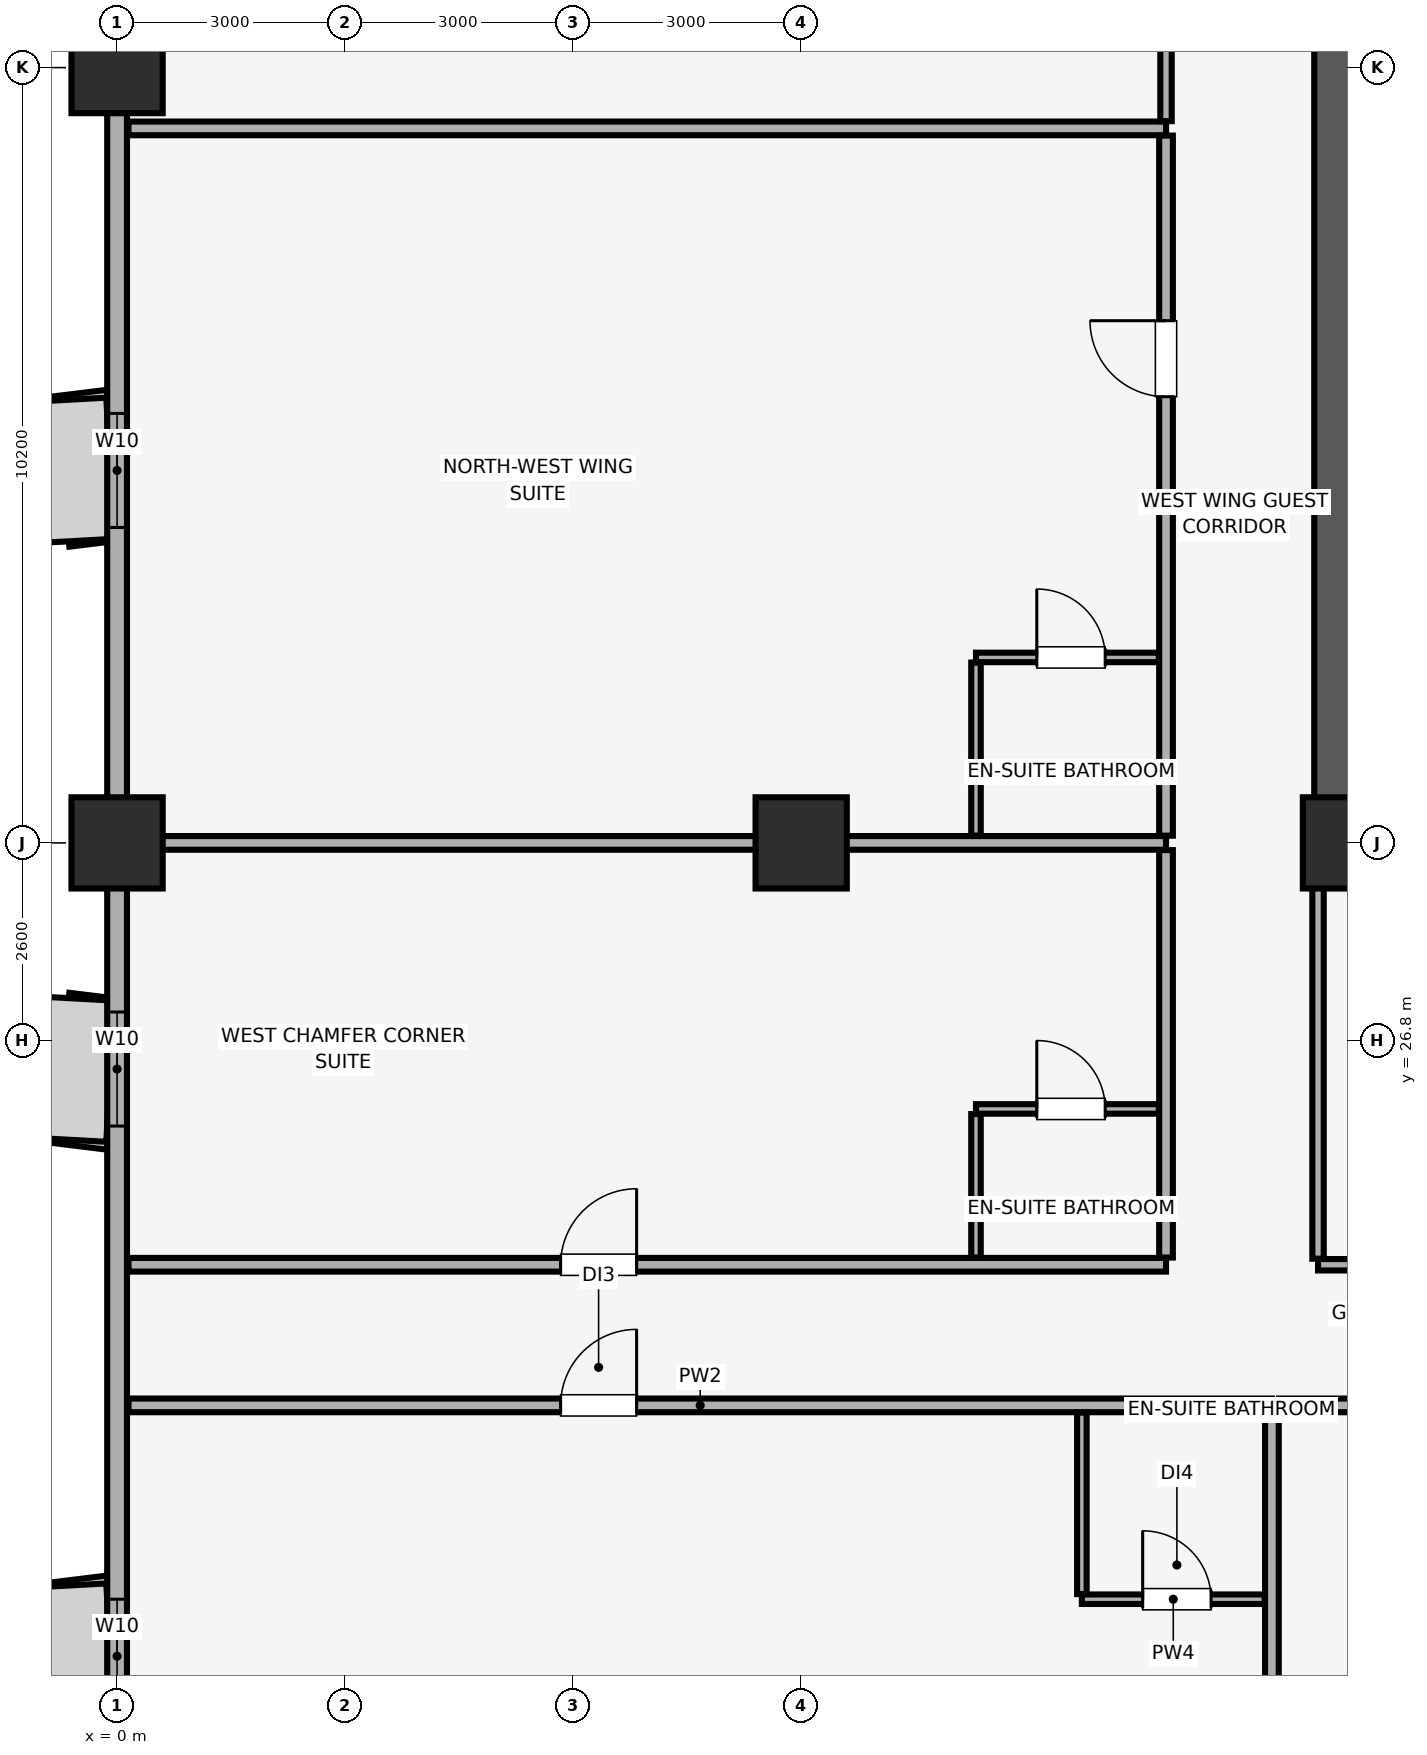
"""IFC4 building model, lengths in metres.
Left out: names, types, materials, properties, quantities, classifications, styles, units other than length and angle.
Written with IfcOpenShell. Run it as: python <this file> out.ifc"""

import sys

from ifc_helpers import new_model, si_unit, direction, frame, frame_2d, origin, origin_2d, place, context, subcontext, project, spatial, rectangle, extrude, element, fill, save


model = new_model("IFC4")
c1 = context("Model", 3, precision=1e-05, world=origin(), true_north=direction((0.0, 1.0)))
c2 = subcontext(c1, "Body", "Model", "MODEL_VIEW")
j1 = project(units=[si_unit("LENGTHUNIT", "METRE"), si_unit("PLANEANGLEUNIT", "RADIAN")], contexts=[c1])
p1 = place(None, origin())
s1 = spatial("IfcSite", under=j1, at=p1, CompositionType="ELEMENT")
p2 = place(p1, origin())
s2 = spatial("IfcBuilding", under=s1, at=p2, CompositionType="ELEMENT")
p3 = place(p2, frame((0.0, 0.0, 104.3)))
s3 = spatial("IfcBuildingStorey", under=s2, at=p3, CompositionType="ELEMENT", Elevation=104.3)
for number, where, z_axis, x_axis in (
    (1, (0.0, 29.4, 0.0), (0.0, 0.0, 1.0), (1.0, 0.0, 0.0)),
    (2, (0.0, 39.6, 0.0), (0.0, 0.0, 1.0), (1.0, 0.0, 0.0)),
    (3, (9.0, 29.4, 0.0), (0.0, 0.0, 1.0), (1.0, 0.0, 0.0)),
    (4, (16.2, 29.4, 0.0), (0.0, 0.0, 1.0), (1.0, 0.0, 0.0)),
):
    element("IfcColumn", number, at=place(p3, frame(where, z_axis=z_axis, x_axis=x_axis)), inside=s3, PredefinedType="COLUMN", context=c2, shape_type="SweptSolid", body=[
        extrude(rectangle(XDim=1.2, YDim=1.2, at=origin_2d()), origin(), (0.0, 0.0, 1.0), 3.51),
    ])
p4 = place(p3, frame((0.0, 44.8, 0.0), z_axis=(0.0, 0.0, 1.0), x_axis=(0.0, -1.0, 0.0)))
e5 = element("IfcWall", 5, at=p4, inside=s3, PredefinedType="SOLIDWALL", context=c2, shape_type="SweptSolid", body=[
    extrude(rectangle(XDim=40.6, YDim=0.26, at=frame_2d((20.3, 0.0))), origin(), (0.0, 0.0, 1.0), 2.56),
])
p5 = place(p4, frame((33.05, 0.0, 0.85)))
e6 = element("IfcOpeningElement", 6, at=p5, cuts=e5, PredefinedType="OPENING", context=c2, shape_type="SweptSolid", body=[
    extrude(rectangle(XDim=1.5, YDim=1.4, at=frame_2d((0.75, 0.7))), frame((0.0, 0.14, 0.0), z_axis=(0.0, -1.0, 0.0), x_axis=(1.0, 0.0, 0.0)), (0.0, 0.0, 1.0), 0.28),
])
p6 = place(p4, frame((25.35, 0.0, 0.85)))
e7 = element("IfcOpeningElement", 7, at=p6, cuts=e5, PredefinedType="OPENING", context=c2, shape_type="SweptSolid", body=[
    extrude(rectangle(XDim=1.5, YDim=1.4, at=frame_2d((0.75, 0.7))), frame((0.0, 0.14, 0.0), z_axis=(0.0, -1.0, 0.0), x_axis=(1.0, 0.0, 0.0)), (0.0, 0.0, 1.0), 0.28),
])
p7 = place(p4, frame((17.625, 0.0, 0.85)))
e8 = element("IfcOpeningElement", 8, at=p7, cuts=e5, PredefinedType="OPENING", context=c2, shape_type="SweptSolid", body=[
    extrude(rectangle(XDim=1.5, YDim=1.4, at=frame_2d((0.75, 0.7))), frame((0.0, 0.14, 0.0), z_axis=(0.0, -1.0, 0.0), x_axis=(1.0, 0.0, 0.0)), (0.0, 0.0, 1.0), 0.28),
])
p8 = place(p4, frame((9.75, 0.0, 0.85)))
e9 = element("IfcOpeningElement", 9, at=p8, cuts=e5, PredefinedType="OPENING", context=c2, shape_type="SweptSolid", body=[
    extrude(rectangle(XDim=1.5, YDim=1.4, at=frame_2d((0.75, 0.7))), frame((0.0, 0.14, 0.0), z_axis=(0.0, -1.0, 0.0), x_axis=(1.0, 0.0, 0.0)), (0.0, 0.0, 1.0), 0.28),
])
p9 = place(p4, frame((1.735, 0.0, 0.85)))
e10 = element("IfcOpeningElement", 10, at=p9, cuts=e5, PredefinedType="OPENING", context=c2, shape_type="SweptSolid", body=[
    extrude(rectangle(XDim=1.5, YDim=1.4, at=frame_2d((0.75, 0.7))), frame((0.0, 0.14, 0.0), z_axis=(0.0, -1.0, 0.0), x_axis=(1.0, 0.0, 0.0)), (0.0, 0.0, 1.0), 0.28),
])
p10 = place(p3, frame((16.2, 29.4, 0.0), z_axis=(0.0, 0.0, 1.0), x_axis=(0.0, 1.0, 0.0)))
e11 = element("IfcWall", 11, at=p10, inside=s3, PredefinedType="SHEAR", context=c2, shape_type="SweptSolid", body=[
    extrude(rectangle(XDim=19.2, YDim=0.9, at=frame_2d((9.6, 0.0))), origin(), (0.0, 0.0, 1.0), 3.51),
])
p11 = place(p3, frame((0.15, 22.0, 0.0), z_axis=(0.0, 0.0, 1.0), x_axis=(1.0, 0.0, 0.0)))
e12 = element("IfcWall", 12, at=p11, inside=s3, PredefinedType="PARTITIONING", context=c2, shape_type="SweptSolid", body=[
    extrude(rectangle(XDim=15.043, YDim=0.18, at=frame_2d((7.521, 0.0))), origin(), (0.0, 0.0, 1.0), 3.51),
])
p12 = place(p11, frame((5.685, 0.0, 0.0)))
e13 = element("IfcOpeningElement", 13, at=p12, cuts=e12, PredefinedType="OPENING", context=c2, shape_type="SweptSolid", body=[
    extrude(rectangle(XDim=1.0, YDim=2.15, at=frame_2d((0.5, 1.075))), frame((0.0, 0.1, 0.0), z_axis=(0.0, -1.0, 0.0), x_axis=(1.0, 0.0, 0.0)), (0.0, 0.0, 1.0), 0.2),
])
p13 = place(p3, frame((15.193, 0.15, 0.0), z_axis=(0.0, 0.0, 1.0), x_axis=(0.0, 1.0, 0.0)))
e14 = element("IfcWall", 14, at=p13, inside=s3, PredefinedType="PARTITIONING", context=c2, shape_type="SweptSolid", body=[
    extrude(rectangle(XDim=21.755, YDim=0.18, at=frame_2d((10.877, 0.0))), origin(), (0.0, 0.0, 1.0), 3.51),
])
p14 = place(p3, frame((12.693, 19.45, 0.0), z_axis=(0.0, 0.0, 1.0), x_axis=(1.0, 0.0, 0.0)))
e15 = element("IfcWall", 15, at=p14, inside=s3, PredefinedType="PARTITIONING", context=c2, shape_type="SweptSolid", body=[
    extrude(rectangle(XDim=2.405, YDim=0.125, at=frame_2d((1.203, 0.0))), origin(), (0.0, 0.0, 1.0), 3.51),
])
p15 = place(p14, frame((0.8, 0.0, 0.0)))
e16 = element("IfcOpeningElement", 16, at=p15, cuts=e15, PredefinedType="OPENING", context=c2, shape_type="SweptSolid", body=[
    extrude(rectangle(XDim=0.9, YDim=2.1, at=frame_2d((0.45, 1.05))), frame((0.0, 0.073, 0.0), z_axis=(0.0, -1.0, 0.0), x_axis=(1.0, 0.0, 0.0)), (0.0, 0.0, 1.0), 0.145),
])
p16 = place(p3, frame((12.693, 19.518, 0.0), z_axis=(0.0, 0.0, 1.0), x_axis=(0.0, 1.0, 0.0)))
e17 = element("IfcWall", 17, at=p16, inside=s3, PredefinedType="PARTITIONING", context=c2, shape_type="SweptSolid", body=[
    extrude(rectangle(XDim=2.387, YDim=0.125, at=frame_2d((1.194, 0.0))), origin(), (0.0, 0.0, 1.0), 2.977),
])
p17 = place(p3, frame((15.288, 22.0, 0.0), z_axis=(0.0, 0.0, 1.0), x_axis=(1.0, 0.0, 0.0)))
e18 = element("IfcWall", 18, at=p17, inside=s3, PredefinedType="PARTITIONING", context=c2, shape_type="SweptSolid", body=[
    extrude(rectangle(XDim=10.648, YDim=0.18, at=frame_2d((5.324, 0.0))), origin(), (0.0, 0.0, 1.0), 3.51),
])
p18 = place(p17, frame((3.97, 0.0, 0.0)))
e19 = element("IfcOpeningElement", 19, at=p18, cuts=e18, PredefinedType="OPENING", context=c2, shape_type="SweptSolid", body=[
    extrude(rectangle(XDim=1.0, YDim=2.15, at=frame_2d((0.5, 1.075))), frame((0.0, 0.1, 0.0), z_axis=(0.0, -1.0, 0.0), x_axis=(1.0, 0.0, 0.0)), (0.0, 0.0, 1.0), 0.2),
])
p19 = place(p3, frame((15.8, 23.85, 0.0), z_axis=(0.0, 0.0, 1.0), x_axis=(1.0, 0.0, 0.0)))
e20 = element("IfcWall", 20, at=p19, inside=s3, PredefinedType="PARTITIONING", context=c2, shape_type="SweptSolid", body=[
    extrude(rectangle(XDim=13.2, YDim=0.15, at=frame_2d((6.6, 0.0))), origin(), (0.0, 0.0, 1.0), 3.51),
])
p20 = place(p19, frame((5.6, 0.0, 0.0)))
e21 = element("IfcOpeningElement", 21, at=p20, cuts=e20, PredefinedType="OPENING", context=c2, shape_type="SweptSolid", body=[
    extrude(rectangle(XDim=1.0, YDim=2.15, at=frame_2d((0.5, 1.075))), frame((0.0, 0.085, 0.0), z_axis=(0.0, -1.0, 0.0), x_axis=(1.0, 0.0, 0.0)), (0.0, 0.0, 1.0), 0.17),
])
p21 = place(p3, frame((15.8, 23.93, 0.0), z_axis=(0.0, 0.0, 1.0), x_axis=(0.0, 1.0, 0.0)))
e22 = element("IfcWall", 22, at=p21, inside=s3, PredefinedType="PARTITIONING", context=c2, shape_type="SweptSolid", body=[
    extrude(rectangle(XDim=5.46, YDim=0.15, at=frame_2d((2.73, 0.0))), origin(), (0.0, 0.0, 1.0), 3.51),
])
p22 = place(p3, frame((0.15, 23.85, 0.0), z_axis=(0.0, 0.0, 1.0), x_axis=(1.0, 0.0, 0.0)))
e23 = element("IfcWall", 23, at=p22, inside=s3, PredefinedType="PARTITIONING", context=c2, shape_type="SweptSolid", body=[
    extrude(rectangle(XDim=13.65, YDim=0.18, at=frame_2d((6.825, 0.0))), origin(), (0.0, 0.0, 1.0), 3.51),
])
p23 = place(p22, frame((5.685, 0.0, 0.0)))
e24 = element("IfcOpeningElement", 24, at=p23, cuts=e23, PredefinedType="OPENING", context=c2, shape_type="SweptSolid", body=[
    extrude(rectangle(XDim=1.0, YDim=2.15, at=frame_2d((0.5, 1.075))), frame((0.0, 0.1, 0.0), z_axis=(0.0, -1.0, 0.0), x_axis=(1.0, 0.0, 0.0)), (0.0, 0.0, 1.0), 0.2),
])
p24 = place(p3, frame((0.15, 29.4, 0.0), z_axis=(0.0, 0.0, 1.0), x_axis=(1.0, 0.0, 0.0)))
e25 = element("IfcWall", 25, at=p24, inside=s3, PredefinedType="PARTITIONING", context=c2, shape_type="SweptSolid", body=[
    extrude(rectangle(XDim=13.65, YDim=0.18, at=frame_2d((6.825, 0.0))), origin(), (0.0, 0.0, 1.0), 2.86),
])
p25 = place(p3, frame((13.8, 23.945, 0.0), z_axis=(0.0, 0.0, 1.0), x_axis=(0.0, 1.0, 0.0)))
e26 = element("IfcWall", 26, at=p25, inside=s3, PredefinedType="PARTITIONING", context=c2, shape_type="SweptSolid", body=[
    extrude(rectangle(XDim=5.36, YDim=0.18, at=frame_2d((2.68, 0.0))), origin(), (0.0, 0.0, 1.0), 3.51),
])
p26 = place(p3, frame((11.3, 25.9, 0.0), z_axis=(0.0, 0.0, 1.0), x_axis=(1.0, 0.0, 0.0)))
e27 = element("IfcWall", 27, at=p26, inside=s3, PredefinedType="PARTITIONING", context=c2, shape_type="SweptSolid", body=[
    extrude(rectangle(XDim=2.405, YDim=0.125, at=frame_2d((1.203, 0.0))), origin(), (0.0, 0.0, 1.0), 3.51),
])
p27 = place(p26, frame((0.8, 0.0, 0.0)))
e28 = element("IfcOpeningElement", 28, at=p27, cuts=e27, PredefinedType="OPENING", context=c2, shape_type="SweptSolid", body=[
    extrude(rectangle(XDim=0.9, YDim=2.1, at=frame_2d((0.45, 1.05))), frame((0.0, 0.073, 0.0), z_axis=(0.0, -1.0, 0.0), x_axis=(1.0, 0.0, 0.0)), (0.0, 0.0, 1.0), 0.145),
])
p28 = place(p3, frame((11.3, 23.945, 0.0), z_axis=(0.0, 0.0, 1.0), x_axis=(0.0, 1.0, 0.0)))
e29 = element("IfcWall", 29, at=p28, inside=s3, PredefinedType="PARTITIONING", context=c2, shape_type="SweptSolid", body=[
    extrude(rectangle(XDim=1.887, YDim=0.125, at=frame_2d((0.944, 0.0))), origin(), (0.0, 0.0, 1.0), 3.51),
])
p29 = place(p3, frame((0.15, 38.8, 0.0), z_axis=(0.0, 0.0, 1.0), x_axis=(1.0, 0.0, 0.0)))
e30 = element("IfcWall", 30, at=p29, inside=s3, PredefinedType="PARTITIONING", context=c2, shape_type="SweptSolid", body=[
    extrude(rectangle(XDim=13.65, YDim=0.18, at=frame_2d((6.825, 0.0))), origin(), (0.0, 0.0, 1.0), 3.51),
])
p30 = place(p3, frame((13.8, 29.495, 0.0), z_axis=(0.0, 0.0, 1.0), x_axis=(0.0, 1.0, 0.0)))
e31 = element("IfcWall", 31, at=p30, inside=s3, PredefinedType="PARTITIONING", context=c2, shape_type="SweptSolid", body=[
    extrude(rectangle(XDim=9.21, YDim=0.18, at=frame_2d((4.605, 0.0))), origin(), (0.0, 0.0, 1.0), 3.51),
])
p31 = place(p30, frame((5.775, 0.0, 0.0)))
e32 = element("IfcOpeningElement", 32, at=p31, cuts=e31, PredefinedType="OPENING", context=c2, shape_type="SweptSolid", body=[
    extrude(rectangle(XDim=1.0, YDim=2.15, at=frame_2d((0.5, 1.075))), frame((0.0, 0.1, 0.0), z_axis=(0.0, -1.0, 0.0), x_axis=(1.0, 0.0, 0.0)), (0.0, 0.0, 1.0), 0.2),
])
p32 = place(p3, frame((11.3, 31.84, 0.0), z_axis=(0.0, 0.0, 1.0), x_axis=(1.0, 0.0, 0.0)))
e33 = element("IfcWall", 33, at=p32, inside=s3, PredefinedType="PARTITIONING", context=c2, shape_type="SweptSolid", body=[
    extrude(rectangle(XDim=2.405, YDim=0.125, at=frame_2d((1.203, 0.0))), origin(), (0.0, 0.0, 1.0), 3.51),
])
p33 = place(p32, frame((0.8, 0.0, 0.0)))
e34 = element("IfcOpeningElement", 34, at=p33, cuts=e33, PredefinedType="OPENING", context=c2, shape_type="SweptSolid", body=[
    extrude(rectangle(XDim=0.9, YDim=2.1, at=frame_2d((0.45, 1.05))), frame((0.0, 0.073, 0.0), z_axis=(0.0, -1.0, 0.0), x_axis=(1.0, 0.0, 0.0)), (0.0, 0.0, 1.0), 0.145),
])
p34 = place(p3, frame((11.3, 29.495, 0.0), z_axis=(0.0, 0.0, 1.0), x_axis=(0.0, 1.0, 0.0)))
e35 = element("IfcWall", 35, at=p34, inside=s3, PredefinedType="PARTITIONING", context=c2, shape_type="SweptSolid", body=[
    extrude(rectangle(XDim=2.277, YDim=0.125, at=frame_2d((1.139, 0.0))), origin(), (0.0, 0.0, 1.0), 3.51),
])
p35 = place(p3, frame((13.8, 38.895, 0.0), z_axis=(0.0, 0.0, 1.0), x_axis=(0.0, 1.0, 0.0)))
e36 = element("IfcWall", 36, at=p35, inside=s3, PredefinedType="PARTITIONING", context=c2, shape_type="SweptSolid", body=[
    extrude(rectangle(XDim=9.955, YDim=0.15, at=frame_2d((4.978, 0.0))), origin(), (0.0, 0.0, 1.0), 3.51),
])
p36 = place(p35, frame((2.105, 0.0, 0.0)))
e37 = element("IfcOpeningElement", 37, at=p36, cuts=e36, PredefinedType="OPENING", context=c2, shape_type="SweptSolid", body=[
    extrude(rectangle(XDim=1.0, YDim=2.15, at=frame_2d((0.5, 1.075))), frame((0.0, 0.085, 0.0), z_axis=(0.0, -1.0, 0.0), x_axis=(1.0, 0.0, 0.0)), (0.0, 0.0, 1.0), 0.17),
])
p37 = place(p6, origin())
e38 = element("IfcWindow", 38, at=p37, inside=s3, PartitioningType="SINGLE_PANEL", PredefinedType="WINDOW", context=c2, shape_type="SweptSolid", body=[
    extrude(rectangle(XDim=1.5, YDim=1.4, at=frame_2d((0.75, 0.7))), frame((0.0, 0.03, 0.0), z_axis=(0.0, -1.0, 0.0), x_axis=(1.0, 0.0, 0.0)), (0.0, 0.0, 1.0), 0.06),
])
fill(e7, e38)
p38 = place(p7, origin())
e39 = element("IfcWindow", 39, at=p38, inside=s3, PartitioningType="SINGLE_PANEL", PredefinedType="WINDOW", context=c2, shape_type="SweptSolid", body=[
    extrude(rectangle(XDim=1.5, YDim=1.4, at=frame_2d((0.75, 0.7))), frame((0.0, 0.03, 0.0), z_axis=(0.0, -1.0, 0.0), x_axis=(1.0, 0.0, 0.0)), (0.0, 0.0, 1.0), 0.06),
])
fill(e8, e39)
p39 = place(p8, origin())
e40 = element("IfcWindow", 40, at=p39, inside=s3, PartitioningType="SINGLE_PANEL", PredefinedType="WINDOW", context=c2, shape_type="SweptSolid", body=[
    extrude(rectangle(XDim=1.5, YDim=1.4, at=frame_2d((0.75, 0.7))), frame((0.0, 0.03, 0.0), z_axis=(0.0, -1.0, 0.0), x_axis=(1.0, 0.0, 0.0)), (0.0, 0.0, 1.0), 0.06),
])
fill(e9, e40)
p40 = place(p12, origin())
e41 = element("IfcDoor", 41, at=p40, inside=s3, OperationType="SINGLE_SWING_RIGHT", PredefinedType="DOOR", context=c2, shape_type="SweptSolid", body=[
    extrude(rectangle(XDim=1.0, YDim=2.15, at=frame_2d((0.5, 1.075))), frame((0.0, 0.025, 0.0), z_axis=(0.0, -1.0, 0.0), x_axis=(1.0, 0.0, 0.0)), (0.0, 0.0, 1.0), 0.05),
])
fill(e13, e41)
p41 = place(p15, origin())
e42 = element("IfcDoor", 42, at=p41, inside=s3, OperationType="SINGLE_SWING_LEFT", PredefinedType="DOOR", context=c2, shape_type="SweptSolid", body=[
    extrude(rectangle(XDim=0.9, YDim=2.1, at=frame_2d((0.45, 1.05))), frame((0.0, 0.025, 0.0), z_axis=(0.0, -1.0, 0.0), x_axis=(1.0, 0.0, 0.0)), (0.0, 0.0, 1.0), 0.05),
])
fill(e16, e42)
p42 = place(p23, origin())
e43 = element("IfcDoor", 43, at=p42, inside=s3, OperationType="SINGLE_SWING_RIGHT", PredefinedType="DOOR", context=c2, shape_type="SweptSolid", body=[
    extrude(rectangle(XDim=1.0, YDim=2.15, at=frame_2d((0.5, 1.075))), frame((0.0, 0.025, 0.0), z_axis=(0.0, -1.0, 0.0), x_axis=(1.0, 0.0, 0.0)), (0.0, 0.0, 1.0), 0.05),
])
fill(e24, e43)
p43 = place(p27, origin())
e44 = element("IfcDoor", 44, at=p43, inside=s3, OperationType="SINGLE_SWING_LEFT", PredefinedType="DOOR", context=c2, shape_type="SweptSolid", body=[
    extrude(rectangle(XDim=0.9, YDim=2.1, at=frame_2d((0.45, 1.05))), frame((0.0, 0.025, 0.0), z_axis=(0.0, -1.0, 0.0), x_axis=(1.0, 0.0, 0.0)), (0.0, 0.0, 1.0), 0.05),
])
fill(e28, e44)
p44 = place(p31, origin())
e45 = element("IfcDoor", 45, at=p44, inside=s3, OperationType="SINGLE_SWING_RIGHT", PredefinedType="DOOR", context=c2, shape_type="SweptSolid", body=[
    extrude(rectangle(XDim=1.0, YDim=2.15, at=frame_2d((0.5, 1.075))), frame((0.0, 0.025, 0.0), z_axis=(0.0, -1.0, 0.0), x_axis=(1.0, 0.0, 0.0)), (0.0, 0.0, 1.0), 0.05),
])
fill(e32, e45)
p45 = place(p33, origin())
e46 = element("IfcDoor", 46, at=p45, inside=s3, OperationType="SINGLE_SWING_LEFT", PredefinedType="DOOR", context=c2, shape_type="SweptSolid", body=[
    extrude(rectangle(XDim=0.9, YDim=2.1, at=frame_2d((0.45, 1.05))), frame((0.0, 0.025, 0.0), z_axis=(0.0, -1.0, 0.0), x_axis=(1.0, 0.0, 0.0)), (0.0, 0.0, 1.0), 0.05),
])
fill(e34, e46)
save(model, sys.argv[1])
